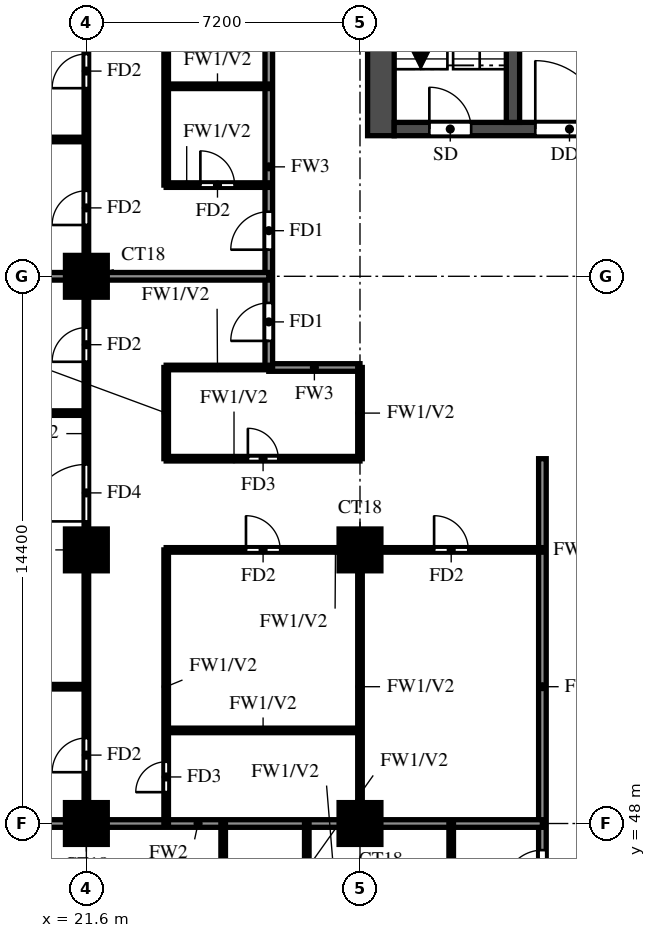
"""IFC4 building model, lengths in metres.
Left out: names, types, materials, properties, quantities, classifications, styles, units other than length and angle.
Written with IfcOpenShell. Run it as: python <this file> out.ifc"""

import sys

from ifc_helpers import new_model, si_unit, direction, frame, frame_2d, origin, origin_2d, place, context, subcontext, project, spatial, rectangle, extrude, source, transform, mapped, element, fill, save


model = new_model("IFC4")
c1 = context("Model", 3, precision=1e-05, world=origin(), true_north=direction((0.0, 1.0)))
c2 = subcontext(c1, "Body", "Model", "MODEL_VIEW")
j1 = project(units=[si_unit("LENGTHUNIT", "METRE"), si_unit("PLANEANGLEUNIT", "RADIAN")], contexts=[c1])
p1 = place(None, origin())
s1 = spatial("IfcSite", under=j1, at=p1, CompositionType="ELEMENT")
p2 = place(p1, origin())
s2 = spatial("IfcBuilding", under=s1, at=p2, CompositionType="ELEMENT")
p3 = place(p2, frame((0.0, 0.0, 120.0)))
s3 = spatial("IfcBuildingStorey", under=s2, at=p3, CompositionType="ELEMENT", Elevation=120.0)
m1 = source(origin(), c2, "Body", "SweptSolid", [
    extrude(rectangle(XDim=1.1, YDim=1.1, at=origin_2d()), origin(), (0.0, 0.0, 1.0), 3.2),
])
for number, where, z_axis, x_axis in (
    (1, (21.6, 48.0, 0.0), (0.0, 0.0, 1.0), (1.0, 0.0, 0.0)),
    (2, (28.8, 48.0, 0.0), (0.0, 0.0, 1.0), (1.0, 0.0, 0.0)),
    (3, (21.6, 55.2, 0.0), (0.0, 0.0, 1.0), (1.0, 0.0, 0.0)),
    (4, (28.8, 55.2, 0.0), (0.0, 0.0, 1.0), (1.0, 0.0, 0.0)),
    (5, (21.6, 62.4, 0.0), (0.0, 0.0, 1.0), (1.0, 0.0, 0.0)),
):
    element("IfcColumn", number, at=place(p3, frame(where, z_axis=z_axis, x_axis=x_axis)), inside=s3, PredefinedType="COLUMN", context=c2, shape_type="MappedRepresentation", body=[
        mapped(m1, transform((0.0, 0.0, 0.0))),
    ])
p4 = place(p3, frame((29.35, 66.1, 0.0), z_axis=(0.0, 0.0, 1.0), x_axis=(0.0, 1.0, 0.0)))
e6 = element("IfcWall", 6, at=p4, inside=s3, PredefinedType="SHEAR", context=c2, shape_type="SweptSolid", body=[
    extrude(rectangle(XDim=11.9, YDim=0.7, at=frame_2d((5.95, 0.0))), origin(), (0.0, 0.0, 1.0), 3.2),
])
p5 = place(p3, frame((29.7, 66.275, 0.0), z_axis=(0.0, 0.0, 1.0), x_axis=(1.0, 0.0, 0.0)))
e7 = element("IfcWall", 7, at=p5, inside=s3, PredefinedType="SHEAR", context=c2, shape_type="SweptSolid", body=[
    extrude(rectangle(XDim=41.4, YDim=0.35, at=frame_2d((20.7, 0.0))), origin(), (0.0, 0.0, 1.0), 3.2),
])
p6 = place(p5, frame((0.925, 0.0, 0.0)))
e8 = element("IfcOpeningElement", 8, at=p6, cuts=e7, PredefinedType="OPENING", context=c2, shape_type="SweptSolid", body=[
    extrude(rectangle(XDim=1.1, YDim=2.1, at=frame_2d((0.55, 1.05))), frame((0.0, 0.185, 0.0), z_axis=(0.0, -1.0, 0.0), x_axis=(1.0, 0.0, 0.0)), (0.0, 0.0, 1.0), 0.37),
])
p7 = place(p5, frame((3.712, 0.0, 0.0)))
e9 = element("IfcOpeningElement", 9, at=p7, cuts=e7, PredefinedType="OPENING", context=c2, shape_type="SweptSolid", body=[
    extrude(rectangle(XDim=1.8, YDim=2.1, at=frame_2d((0.9, 1.05))), frame((0.0, 0.185, 0.0), z_axis=(0.0, -1.0, 0.0), x_axis=(1.0, 0.0, 0.0)), (0.0, 0.0, 1.0), 0.37),
])
p8 = place(p3, frame((32.825, 66.45, 0.0), z_axis=(0.0, 0.0, 1.0), x_axis=(0.0, 1.0, 0.0)))
e10 = element("IfcWall", 10, at=p8, inside=s3, PredefinedType="SHEAR", context=c2, shape_type="SweptSolid", body=[
    extrude(rectangle(XDim=10.85, YDim=0.35, at=frame_2d((5.425, 0.0))), origin(), (0.0, 0.0, 1.0), 3.2),
])
p9 = place(p3, frame((26.4, 60.0, 0.0), z_axis=(0.0, 0.0, 1.0), x_axis=(1.0, 0.0, 0.0)))
e11 = element("IfcWall", 11, at=p9, inside=s3, PredefinedType="SOLIDWALL", context=c2, shape_type="SweptSolid", body=[
    extrude(rectangle(XDim=2.4, YDim=0.2, at=frame_2d((1.2, 0.0))), origin(), (0.0, 0.0, 1.0), 3.2),
])
p10 = place(p3, frame((26.4, 60.0, 0.0), z_axis=(0.0, 0.0, 1.0), x_axis=(0.0, 1.0, 0.0)))
e12 = element("IfcWall", 12, at=p10, inside=s3, PredefinedType="SOLIDWALL", context=c2, shape_type="SweptSolid", body=[
    extrude(rectangle(XDim=9.6, YDim=0.2, at=frame_2d((4.8, 0.0))), origin(), (0.0, 0.0, 1.0), 3.2),
])
p11 = place(p10, frame((0.7, 0.0, 0.0)))
e13 = element("IfcOpeningElement", 13, at=p11, cuts=e12, PredefinedType="OPENING", context=c2, shape_type="SweptSolid", body=[
    extrude(rectangle(XDim=1.0, YDim=2.1, at=frame_2d((0.5, 1.05))), frame((0.0, 0.11, 0.0), z_axis=(0.0, -1.0, 0.0), x_axis=(1.0, 0.0, 0.0)), (0.0, 0.0, 1.0), 0.22),
])
p12 = place(p10, frame((3.1, 0.0, 0.0)))
e14 = element("IfcOpeningElement", 14, at=p12, cuts=e12, PredefinedType="OPENING", context=c2, shape_type="SweptSolid", body=[
    extrude(rectangle(XDim=1.0, YDim=2.1, at=frame_2d((0.5, 1.05))), frame((0.0, 0.11, 0.0), z_axis=(0.0, -1.0, 0.0), x_axis=(1.0, 0.0, 0.0)), (0.0, 0.0, 1.0), 0.22),
])
p13 = place(p3, frame((33.6, 45.6, 0.0), z_axis=(0.0, 0.0, 1.0), x_axis=(0.0, 1.0, 0.0)))
e15 = element("IfcWall", 15, at=p13, inside=s3, PredefinedType="SOLIDWALL", context=c2, shape_type="SweptSolid", body=[
    extrude(rectangle(XDim=12.0, YDim=0.2, at=frame_2d((6.0, 0.0))), origin(), (0.0, 0.0, 1.0), 3.2),
])
p14 = place(p13, frame((0.7, 0.0, 0.0)))
e16 = element("IfcOpeningElement", 16, at=p14, cuts=e15, PredefinedType="OPENING", context=c2, shape_type="SweptSolid", body=[
    extrude(rectangle(XDim=1.0, YDim=2.1, at=frame_2d((0.5, 1.05))), frame((0.0, 0.11, 0.0), z_axis=(0.0, -1.0, 0.0), x_axis=(1.0, 0.0, 0.0)), (0.0, 0.0, 1.0), 0.22),
])
p15 = place(p3, frame((14.525, 48.0, 0.0), z_axis=(0.0, 0.0, 1.0), x_axis=(1.0, 0.0, 0.0)))
e17 = element("IfcWall", 17, at=p15, inside=s3, PredefinedType="SOLIDWALL", context=c2, shape_type="SweptSolid", body=[
    extrude(rectangle(XDim=19.075, YDim=0.2, at=frame_2d((9.538, 0.0))), origin(), (0.0, 0.0, 1.0), 3.2),
])
p16 = place(p3, frame((14.525, 62.4, 0.0), z_axis=(0.0, 0.0, 1.0), x_axis=(1.0, 0.0, 0.0)))
e18 = element("IfcWall", 18, at=p16, inside=s3, PredefinedType="SOLIDWALL", context=c2, shape_type="SweptSolid", body=[
    extrude(rectangle(XDim=11.875, YDim=0.2, at=frame_2d((5.938, 0.0))), origin(), (0.0, 0.0, 1.0), 3.2),
])
p17 = place(p3, frame((23.7, 50.45, 0.0), z_axis=(0.0, 0.0, 1.0), x_axis=(1.0, 0.0, 0.0)))
e19 = element("IfcWall", 19, at=p17, inside=s3, PredefinedType="PARTITIONING", context=c2, shape_type="SweptSolid", body=[
    extrude(rectangle(XDim=5.1, YDim=0.12, at=frame_2d((2.55, 0.0))), origin(), (0.0, 0.0, 1.0), 3.2),
])
p18 = place(p3, frame((14.525, 51.6, 0.0), z_axis=(0.0, 0.0, 1.0), x_axis=(1.0, 0.0, 0.0)))
e20 = element("IfcWall", 20, at=p18, inside=s3, PredefinedType="PARTITIONING", context=c2, shape_type="SweptSolid", body=[
    extrude(rectangle(XDim=7.075, YDim=0.12, at=frame_2d((3.538, 0.0))), origin(), (0.0, 0.0, 1.0), 2.3),
])
p19 = place(p3, frame((23.7, 55.2, 0.0), z_axis=(0.0, 0.0, 1.0), x_axis=(1.0, 0.0, 0.0)))
e21 = element("IfcWall", 21, at=p19, inside=s3, PredefinedType="PARTITIONING", context=c2, shape_type="SweptSolid", body=[
    extrude(rectangle(XDim=9.9, YDim=0.12, at=frame_2d((4.95, 0.0))), origin(), (0.0, 0.0, 1.0), 3.2),
])
p20 = place(p19, frame((2.1, 0.0, 0.0)))
e22 = element("IfcOpeningElement", 22, at=p20, cuts=e21, PredefinedType="OPENING", context=c2, shape_type="SweptSolid", body=[
    extrude(rectangle(XDim=0.9, YDim=2.1, at=frame_2d((0.45, 1.05))), frame((0.0, 0.07, 0.0), z_axis=(0.0, -1.0, 0.0), x_axis=(1.0, 0.0, 0.0)), (0.0, 0.0, 1.0), 0.14),
])
p21 = place(p19, frame((7.05, 0.0, 0.0)))
e23 = element("IfcOpeningElement", 23, at=p21, cuts=e21, PredefinedType="OPENING", context=c2, shape_type="SweptSolid", body=[
    extrude(rectangle(XDim=0.9, YDim=2.1, at=frame_2d((0.45, 1.05))), frame((0.0, 0.07, 0.0), z_axis=(0.0, -1.0, 0.0), x_axis=(1.0, 0.0, 0.0)), (0.0, 0.0, 1.0), 0.14),
])
p22 = place(p3, frame((23.7, 57.6, 0.0), z_axis=(0.0, 0.0, 1.0), x_axis=(1.0, 0.0, 0.0)))
e24 = element("IfcWall", 24, at=p22, inside=s3, PredefinedType="PARTITIONING", context=c2, shape_type="SweptSolid", body=[
    extrude(rectangle(XDim=5.1, YDim=0.12, at=frame_2d((2.55, 0.0))), origin(), (0.0, 0.0, 1.0), 3.2),
])
p23 = place(p22, frame((2.15, 0.0, 0.0)))
e25 = element("IfcOpeningElement", 25, at=p23, cuts=e24, PredefinedType="OPENING", context=c2, shape_type="SweptSolid", body=[
    extrude(rectangle(XDim=0.8, YDim=2.1, at=frame_2d((0.4, 1.05))), frame((0.0, 0.07, 0.0), z_axis=(0.0, -1.0, 0.0), x_axis=(1.0, 0.0, 0.0)), (0.0, 0.0, 1.0), 0.14),
])
p24 = place(p3, frame((14.525, 58.8, 0.0), z_axis=(0.0, 0.0, 1.0), x_axis=(1.0, 0.0, 0.0)))
e26 = element("IfcWall", 26, at=p24, inside=s3, PredefinedType="PARTITIONING", context=c2, shape_type="SweptSolid", body=[
    extrude(rectangle(XDim=7.075, YDim=0.12, at=frame_2d((3.538, 0.0))), origin(), (0.0, 0.0, 1.0), 2.3),
])
p25 = place(p3, frame((23.7, 60.0, 0.0), z_axis=(0.0, 0.0, 1.0), x_axis=(1.0, 0.0, 0.0)))
e27 = element("IfcWall", 27, at=p25, inside=s3, PredefinedType="PARTITIONING", context=c2, shape_type="SweptSolid", body=[
    extrude(rectangle(XDim=2.7, YDim=0.12, at=frame_2d((1.35, 0.0))), origin(), (0.0, 0.0, 1.0), 3.2),
])
p26 = place(p3, frame((23.7, 64.8, 0.0), z_axis=(0.0, 0.0, 1.0), x_axis=(1.0, 0.0, 0.0)))
e28 = element("IfcWall", 28, at=p26, inside=s3, PredefinedType="PARTITIONING", context=c2, shape_type="SweptSolid", body=[
    extrude(rectangle(XDim=2.7, YDim=0.12, at=frame_2d((1.35, 0.0))), origin(), (0.0, 0.0, 1.0), 3.2),
])
p27 = place(p26, frame((0.9, 0.0, 0.0)))
e29 = element("IfcOpeningElement", 29, at=p27, cuts=e28, PredefinedType="OPENING", context=c2, shape_type="SweptSolid", body=[
    extrude(rectangle(XDim=0.9, YDim=2.1, at=frame_2d((0.45, 1.05))), frame((0.0, 0.07, 0.0), z_axis=(0.0, -1.0, 0.0), x_axis=(1.0, 0.0, 0.0)), (0.0, 0.0, 1.0), 0.14),
])
p28 = place(p3, frame((14.525, 66.0, 0.0), z_axis=(0.0, 0.0, 1.0), x_axis=(1.0, 0.0, 0.0)))
e30 = element("IfcWall", 30, at=p28, inside=s3, PredefinedType="PARTITIONING", context=c2, shape_type="SweptSolid", body=[
    extrude(rectangle(XDim=7.075, YDim=0.12, at=frame_2d((3.538, 0.0))), origin(), (0.0, 0.0, 1.0), 2.3),
])
p29 = place(p3, frame((23.7, 67.4, 0.0), z_axis=(0.0, 0.0, 1.0), x_axis=(1.0, 0.0, 0.0)))
e31 = element("IfcWall", 31, at=p29, inside=s3, PredefinedType="PARTITIONING", context=c2, shape_type="SweptSolid", body=[
    extrude(rectangle(XDim=2.7, YDim=0.12, at=frame_2d((1.35, 0.0))), origin(), (0.0, 0.0, 1.0), 3.2),
])
p30 = place(p3, frame((21.6, 48.0, 0.0), z_axis=(0.0, 0.0, 1.0), x_axis=(0.0, 1.0, 0.0)))
e32 = element("IfcWall", 32, at=p30, inside=s3, PredefinedType="PARTITIONING", context=c2, shape_type="SweptSolid", body=[
    extrude(rectangle(XDim=21.6, YDim=0.12, at=frame_2d((10.8, 0.0))), origin(), (0.0, 0.0, 1.0), 3.2),
])
p31 = place(p30, frame((1.35, 0.0, 0.0)))
e33 = element("IfcOpeningElement", 33, at=p31, cuts=e32, PredefinedType="OPENING", context=c2, shape_type="SweptSolid", body=[
    extrude(rectangle(XDim=0.9, YDim=2.1, at=frame_2d((0.45, 1.05))), frame((0.0, 0.07, 0.0), z_axis=(0.0, -1.0, 0.0), x_axis=(1.0, 0.0, 0.0)), (0.0, 0.0, 1.0), 0.14),
])
p32 = place(p30, frame((7.95, 0.0, 0.0)))
e34 = element("IfcOpeningElement", 34, at=p32, cuts=e32, PredefinedType="OPENING", context=c2, shape_type="SweptSolid", body=[
    extrude(rectangle(XDim=1.5, YDim=2.1, at=frame_2d((0.75, 1.05))), frame((0.0, 0.07, 0.0), z_axis=(0.0, -1.0, 0.0), x_axis=(1.0, 0.0, 0.0)), (0.0, 0.0, 1.0), 0.14),
])
p33 = place(p30, frame((12.15, 0.0, 0.0)))
e35 = element("IfcOpeningElement", 35, at=p33, cuts=e32, PredefinedType="OPENING", context=c2, shape_type="SweptSolid", body=[
    extrude(rectangle(XDim=0.9, YDim=2.1, at=frame_2d((0.45, 1.05))), frame((0.0, 0.07, 0.0), z_axis=(0.0, -1.0, 0.0), x_axis=(1.0, 0.0, 0.0)), (0.0, 0.0, 1.0), 0.14),
])
p34 = place(p30, frame((15.75, 0.0, 0.0)))
e36 = element("IfcOpeningElement", 36, at=p34, cuts=e32, PredefinedType="OPENING", context=c2, shape_type="SweptSolid", body=[
    extrude(rectangle(XDim=0.9, YDim=2.1, at=frame_2d((0.45, 1.05))), frame((0.0, 0.07, 0.0), z_axis=(0.0, -1.0, 0.0), x_axis=(1.0, 0.0, 0.0)), (0.0, 0.0, 1.0), 0.14),
])
p35 = place(p30, frame((19.35, 0.0, 0.0)))
e37 = element("IfcOpeningElement", 37, at=p35, cuts=e32, PredefinedType="OPENING", context=c2, shape_type="SweptSolid", body=[
    extrude(rectangle(XDim=0.9, YDim=2.1, at=frame_2d((0.45, 1.05))), frame((0.0, 0.07, 0.0), z_axis=(0.0, -1.0, 0.0), x_axis=(1.0, 0.0, 0.0)), (0.0, 0.0, 1.0), 0.14),
])
p36 = place(p3, frame((23.7, 48.0, 0.0), z_axis=(0.0, 0.0, 1.0), x_axis=(0.0, 1.0, 0.0)))
e38 = element("IfcWall", 38, at=p36, inside=s3, PredefinedType="PARTITIONING", context=c2, shape_type="SweptSolid", body=[
    extrude(rectangle(XDim=7.2, YDim=0.12, at=frame_2d((3.6, 0.0))), origin(), (0.0, 0.0, 1.0), 3.2),
])
p37 = place(p36, frame((0.825, 0.0, 0.0)))
e39 = element("IfcOpeningElement", 39, at=p37, cuts=e38, PredefinedType="OPENING", context=c2, shape_type="SweptSolid", body=[
    extrude(rectangle(XDim=0.8, YDim=2.1, at=frame_2d((0.4, 1.05))), frame((0.0, 0.07, 0.0), z_axis=(0.0, -1.0, 0.0), x_axis=(1.0, 0.0, 0.0)), (0.0, 0.0, 1.0), 0.14),
])
p38 = place(p3, frame((23.7, 57.6, 0.0), z_axis=(0.0, 0.0, 1.0), x_axis=(0.0, 1.0, 0.0)))
e40 = element("IfcWall", 40, at=p38, inside=s3, PredefinedType="PARTITIONING", context=c2, shape_type="SweptSolid", body=[
    extrude(rectangle(XDim=2.4, YDim=0.12, at=frame_2d((1.2, 0.0))), origin(), (0.0, 0.0, 1.0), 3.2),
])
p39 = place(p3, frame((23.7, 64.8, 0.0), z_axis=(0.0, 0.0, 1.0), x_axis=(0.0, 1.0, 0.0)))
e41 = element("IfcWall", 41, at=p39, inside=s3, PredefinedType="PARTITIONING", context=c2, shape_type="SweptSolid", body=[
    extrude(rectangle(XDim=8.4, YDim=0.12, at=frame_2d((4.2, 0.0))), origin(), (0.0, 0.0, 1.0), 3.2),
])
p40 = place(p39, frame((5.05, 0.0, 0.0)))
e42 = element("IfcOpeningElement", 42, at=p40, cuts=e41, PredefinedType="OPENING", context=c2, shape_type="SweptSolid", body=[
    extrude(rectangle(XDim=0.9, YDim=2.1, at=frame_2d((0.45, 1.05))), frame((0.0, 0.07, 0.0), z_axis=(0.0, -1.0, 0.0), x_axis=(1.0, 0.0, 0.0)), (0.0, 0.0, 1.0), 0.14),
])
p41 = place(p3, frame((25.2, 39.725, 0.0), z_axis=(0.0, 0.0, 1.0), x_axis=(0.0, 1.0, 0.0)))
e43 = element("IfcWall", 43, at=p41, inside=s3, PredefinedType="PARTITIONING", context=c2, shape_type="SweptSolid", body=[
    extrude(rectangle(XDim=8.275, YDim=0.12, at=frame_2d((4.137, 0.0))), origin(), (0.0, 0.0, 1.0), 3.2),
])
p42 = place(p41, frame((4.525, 0.0, 0.0)))
e44 = element("IfcOpeningElement", 44, at=p42, cuts=e43, PredefinedType="OPENING", context=c2, shape_type="SweptSolid", body=[
    extrude(rectangle(XDim=0.9, YDim=2.1, at=frame_2d((0.45, 1.05))), frame((0.0, 0.07, 0.0), z_axis=(0.0, -1.0, 0.0), x_axis=(1.0, 0.0, 0.0)), (0.0, 0.0, 1.0), 0.14),
])
p43 = place(p3, frame((27.4, 45.6, 0.0), z_axis=(0.0, 0.0, 1.0), x_axis=(0.0, 1.0, 0.0)))
e45 = element("IfcWall", 45, at=p43, inside=s3, PredefinedType="PARTITIONING", context=c2, shape_type="SweptSolid", body=[
    extrude(rectangle(XDim=2.4, YDim=0.12, at=frame_2d((1.2, 0.0))), origin(), (0.0, 0.0, 1.0), 3.2),
])
p44 = place(p3, frame((28.8, 48.0, 0.0), z_axis=(0.0, 0.0, 1.0), x_axis=(0.0, 1.0, 0.0)))
e46 = element("IfcWall", 46, at=p44, inside=s3, PredefinedType="PARTITIONING", context=c2, shape_type="SweptSolid", body=[
    extrude(rectangle(XDim=7.2, YDim=0.12, at=frame_2d((3.6, 0.0))), origin(), (0.0, 0.0, 1.0), 3.2),
])
for number, where, z_axis, x_axis in (
    (47, (28.8, 57.6, 0.0), (0.0, 0.0, 1.0), (0.0, 1.0, 0.0)),
    (48, (31.2, 45.6, 0.0), (0.0, 0.0, 1.0), (0.0, 1.0, 0.0)),
):
    element("IfcWall", number, at=place(p3, frame(where, z_axis=z_axis, x_axis=x_axis)), inside=s3, PredefinedType="PARTITIONING", context=c2, shape_type="SweptSolid", body=[
        extrude(rectangle(XDim=2.4, YDim=0.12, at=frame_2d((1.2, 0.0))), origin(), (0.0, 0.0, 1.0), 3.2),
    ])
p45 = place(p6, origin())
e49 = element("IfcDoor", 49, at=p45, inside=s3, OperationType="SINGLE_SWING_LEFT", PredefinedType="DOOR", context=c2, shape_type="SweptSolid", body=[
    extrude(rectangle(XDim=1.1, YDim=2.1, at=frame_2d((0.55, 1.05))), frame((0.0, 0.025, 0.0), z_axis=(0.0, -1.0, 0.0), x_axis=(1.0, 0.0, 0.0)), (0.0, 0.0, 1.0), 0.05),
])
fill(e8, e49)
p46 = place(p7, origin())
e50 = element("IfcDoor", 50, at=p46, inside=s3, OperationType="DOUBLE_DOOR_SINGLE_SWING", PredefinedType="DOOR", context=c2, shape_type="SweptSolid", body=[
    extrude(rectangle(XDim=1.8, YDim=2.1, at=frame_2d((0.9, 1.05))), frame((0.0, 0.025, 0.0), z_axis=(0.0, -1.0, 0.0), x_axis=(1.0, 0.0, 0.0)), (0.0, 0.0, 1.0), 0.05),
])
fill(e9, e50)
p47 = place(p14, origin())
e51 = element("IfcDoor", 51, at=p47, inside=s3, OperationType="SINGLE_SWING_LEFT", PredefinedType="DOOR", context=c2, shape_type="SweptSolid", body=[
    extrude(rectangle(XDim=1.0, YDim=2.1, at=frame_2d((0.5, 1.05))), frame((0.0, 0.025, 0.0), z_axis=(0.0, -1.0, 0.0), x_axis=(1.0, 0.0, 0.0)), (0.0, 0.0, 1.0), 0.05),
])
fill(e16, e51)
p48 = place(p11, origin())
e52 = element("IfcDoor", 52, at=p48, inside=s3, OperationType="SINGLE_SWING_LEFT", PredefinedType="DOOR", context=c2, shape_type="SweptSolid", body=[
    extrude(rectangle(XDim=1.0, YDim=2.1, at=frame_2d((0.5, 1.05))), frame((0.0, 0.025, 0.0), z_axis=(0.0, -1.0, 0.0), x_axis=(1.0, 0.0, 0.0)), (0.0, 0.0, 1.0), 0.05),
])
fill(e13, e52)
p49 = place(p31, origin())
e53 = element("IfcDoor", 53, at=p49, inside=s3, OperationType="SINGLE_SWING_RIGHT", PredefinedType="DOOR", context=c2, shape_type="SweptSolid", body=[
    extrude(rectangle(XDim=0.9, YDim=2.1, at=frame_2d((0.45, 1.05))), frame((0.0, 0.025, 0.0), z_axis=(0.0, -1.0, 0.0), x_axis=(1.0, 0.0, 0.0)), (0.0, 0.0, 1.0), 0.05),
])
fill(e33, e53)
p50 = place(p32, origin())
e54 = element("IfcDoor", 54, at=p50, inside=s3, OperationType="SINGLE_SWING_RIGHT", PredefinedType="DOOR", context=c2, shape_type="SweptSolid", body=[
    extrude(rectangle(XDim=1.5, YDim=2.1, at=frame_2d((0.75, 1.05))), frame((0.0, 0.025, 0.0), z_axis=(0.0, -1.0, 0.0), x_axis=(1.0, 0.0, 0.0)), (0.0, 0.0, 1.0), 0.05),
])
fill(e34, e54)
p51 = place(p33, origin())
e55 = element("IfcDoor", 55, at=p51, inside=s3, OperationType="SINGLE_SWING_LEFT", PredefinedType="DOOR", context=c2, shape_type="SweptSolid", body=[
    extrude(rectangle(XDim=0.9, YDim=2.1, at=frame_2d((0.45, 1.05))), frame((0.0, 0.025, 0.0), z_axis=(0.0, -1.0, 0.0), x_axis=(1.0, 0.0, 0.0)), (0.0, 0.0, 1.0), 0.05),
])
fill(e35, e55)
p52 = place(p37, origin())
e56 = element("IfcDoor", 56, at=p52, inside=s3, OperationType="SINGLE_SWING_RIGHT", PredefinedType="DOOR", context=c2, shape_type="SweptSolid", body=[
    extrude(rectangle(XDim=0.8, YDim=2.1, at=frame_2d((0.4, 1.05))), frame((0.0, 0.025, 0.0), z_axis=(0.0, -1.0, 0.0), x_axis=(1.0, 0.0, 0.0)), (0.0, 0.0, 1.0), 0.05),
])
fill(e39, e56)
p53 = place(p20, origin())
e57 = element("IfcDoor", 57, at=p53, inside=s3, OperationType="SINGLE_SWING_LEFT", PredefinedType="DOOR", context=c2, shape_type="SweptSolid", body=[
    extrude(rectangle(XDim=0.9, YDim=2.1, at=frame_2d((0.45, 1.05))), frame((0.0, 0.025, 0.0), z_axis=(0.0, -1.0, 0.0), x_axis=(1.0, 0.0, 0.0)), (0.0, 0.0, 1.0), 0.05),
])
fill(e22, e57)
p54 = place(p23, origin())
e58 = element("IfcDoor", 58, at=p54, inside=s3, OperationType="SINGLE_SWING_LEFT", PredefinedType="DOOR", context=c2, shape_type="SweptSolid", body=[
    extrude(rectangle(XDim=0.8, YDim=2.1, at=frame_2d((0.4, 1.05))), frame((0.0, 0.025, 0.0), z_axis=(0.0, -1.0, 0.0), x_axis=(1.0, 0.0, 0.0)), (0.0, 0.0, 1.0), 0.05),
])
fill(e25, e58)
p55 = place(p21, origin())
e59 = element("IfcDoor", 59, at=p55, inside=s3, OperationType="SINGLE_SWING_RIGHT", PredefinedType="DOOR", context=c2, shape_type="SweptSolid", body=[
    extrude(rectangle(XDim=0.9, YDim=2.1, at=frame_2d((0.45, 1.05))), frame((0.0, 0.025, 0.0), z_axis=(0.0, -1.0, 0.0), x_axis=(1.0, 0.0, 0.0)), (0.0, 0.0, 1.0), 0.05),
])
fill(e23, e59)
p56 = place(p12, origin())
e60 = element("IfcDoor", 60, at=p56, inside=s3, OperationType="SINGLE_SWING_LEFT", PredefinedType="DOOR", context=c2, shape_type="SweptSolid", body=[
    extrude(rectangle(XDim=1.0, YDim=2.1, at=frame_2d((0.5, 1.05))), frame((0.0, 0.025, 0.0), z_axis=(0.0, -1.0, 0.0), x_axis=(1.0, 0.0, 0.0)), (0.0, 0.0, 1.0), 0.05),
])
fill(e14, e60)
p57 = place(p34, origin())
e61 = element("IfcDoor", 61, at=p57, inside=s3, OperationType="SINGLE_SWING_LEFT", PredefinedType="DOOR", context=c2, shape_type="SweptSolid", body=[
    extrude(rectangle(XDim=0.9, YDim=2.1, at=frame_2d((0.45, 1.05))), frame((0.0, 0.025, 0.0), z_axis=(0.0, -1.0, 0.0), x_axis=(1.0, 0.0, 0.0)), (0.0, 0.0, 1.0), 0.05),
])
fill(e36, e61)
p58 = place(p35, origin())
e62 = element("IfcDoor", 62, at=p58, inside=s3, OperationType="SINGLE_SWING_RIGHT", PredefinedType="DOOR", context=c2, shape_type="SweptSolid", body=[
    extrude(rectangle(XDim=0.9, YDim=2.1, at=frame_2d((0.45, 1.05))), frame((0.0, 0.025, 0.0), z_axis=(0.0, -1.0, 0.0), x_axis=(1.0, 0.0, 0.0)), (0.0, 0.0, 1.0), 0.05),
])
fill(e37, e62)
p59 = place(p27, origin())
e63 = element("IfcDoor", 63, at=p59, inside=s3, OperationType="SINGLE_SWING_RIGHT", PredefinedType="DOOR", context=c2, shape_type="SweptSolid", body=[
    extrude(rectangle(XDim=0.9, YDim=2.1, at=frame_2d((0.45, 1.05))), frame((0.0, 0.025, 0.0), z_axis=(0.0, -1.0, 0.0), x_axis=(1.0, 0.0, 0.0)), (0.0, 0.0, 1.0), 0.05),
])
fill(e29, e63)
save(model, sys.argv[1])
